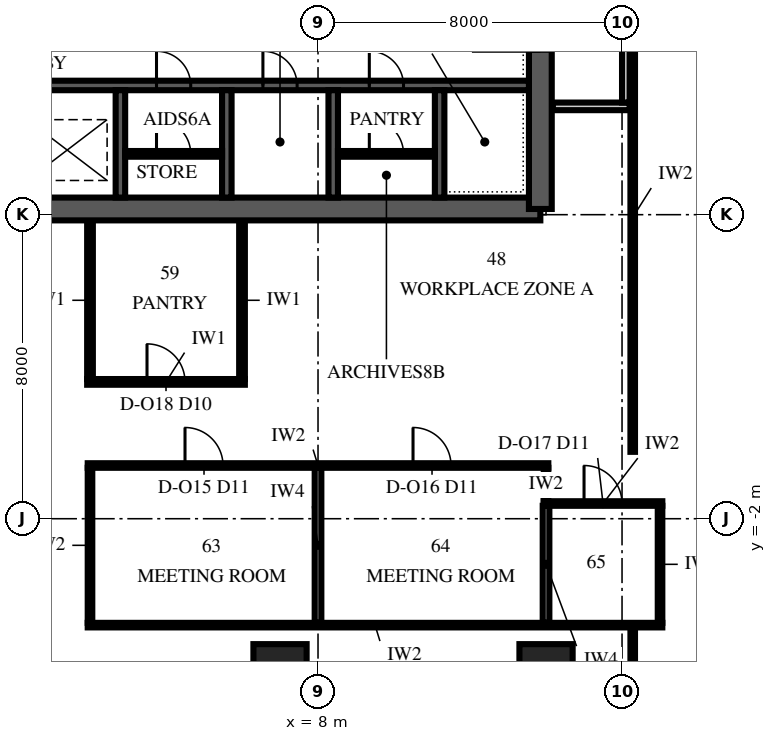
"""IFC4 building model, lengths in metres.
Left out: names, types, materials, properties, quantities, classifications, styles, units other than length and angle.
Written with IfcOpenShell. Run it as: python <this file> out.ifc"""

import sys

from ifc_helpers import new_model, si_unit, direction, frame, frame_2d, origin, origin_2d, place, context, subcontext, project, spatial, polyline, rectangle, outline, extrude, element, fill, save


model = new_model("IFC4")
c1 = context("Model", 3, precision=1e-05, world=origin(), true_north=direction((0.0, 1.0)))
c2 = subcontext(c1, "Body", "Model", "MODEL_VIEW")
j1 = project(units=[si_unit("LENGTHUNIT", "METRE"), si_unit("PLANEANGLEUNIT", "RADIAN")], contexts=[c1])
p1 = place(None, origin())
s1 = spatial("IfcSite", under=j1, at=p1, CompositionType="ELEMENT")
p2 = place(p1, origin())
s2 = spatial("IfcBuilding", under=s1, at=p2, CompositionType="ELEMENT")
p3 = place(p2, frame((0.0, 0.0, 190.0)))
s3 = spatial("IfcBuildingStorey", under=s2, at=p3, CompositionType="ELEMENT", Elevation=190.0)
for number, where, z_axis, x_axis in (
    (1, (7.0, -6.0, 0.0), (0.0, 0.0, 1.0), (1.0, 0.0, 0.0)),
    (2, (14.0, -6.0, 0.0), (0.0, 0.0, 1.0), (1.0, 0.0, 0.0)),
):
    element("IfcColumn", number, at=place(p3, frame(where, z_axis=z_axis, x_axis=x_axis)), inside=s3, PredefinedType="COLUMN", context=c2, shape_type="SweptSolid", body=[
        extrude(rectangle(XDim=1.4, YDim=1.4, at=origin_2d()), origin(), (0.0, 0.0, 1.0), 4.0),
    ])
p4 = place(p3, frame((-13.85, 6.15, 0.0), z_axis=(0.0, 0.0, 1.0), x_axis=(1.0, 0.0, 0.0)))
e3 = element("IfcWall", 3, at=p4, inside=s3, PredefinedType="SHEAR", context=c2, shape_type="SweptSolid", body=[
    extrude(rectangle(XDim=27.7, YDim=0.6, at=frame_2d((13.85, 0.0))), origin(), (0.0, 0.0, 1.0), 4.0),
])
p5 = place(p3, frame((13.85, 6.15, 0.0), z_axis=(0.0, 0.0, 1.0), x_axis=(0.0, 1.0, 0.0)))
e4 = element("IfcWall", 4, at=p5, inside=s3, PredefinedType="SHEAR", context=c2, shape_type="SweptSolid", body=[
    extrude(outline(polyline([(0.0, -0.3), (17.7, -0.3), (17.7, 0.0), (17.4, 0.0), (17.4, 0.3), (0.3, 0.3), (0.3, 0.0), (0.0, 0.0), (0.0, -0.3)])), origin(), (0.0, 0.0, 1.0), 4.0),
])
p6 = place(p5, frame((4.15, 0.0, 0.0)))
e5 = element("IfcOpeningElement", 5, at=p6, cuts=e4, PredefinedType="OPENING", context=c2, shape_type="SweptSolid", body=[
    extrude(rectangle(XDim=1.8, YDim=2.4, at=frame_2d((0.9, 1.2))), frame((0.0, 0.315, 0.0), z_axis=(0.0, -1.0, 0.0), x_axis=(1.0, 0.0, 0.0)), (0.0, 0.0, 1.0), 0.63),
])
p7 = place(p3, frame((-13.55, 9.4, 0.0), z_axis=(0.0, 0.0, 1.0), x_axis=(1.0, 0.0, 0.0)))
e6 = element("IfcWall", 6, at=p7, inside=s3, PredefinedType="SHEAR", context=c2, shape_type="SweptSolid", body=[
    extrude(rectangle(XDim=27.1, YDim=0.25, at=frame_2d((13.55, 0.0))), origin(), (0.0, 0.0, 1.0), 4.0),
])
p8 = place(p7, frame((0.4, 0.0, 0.0)))
e7 = element("IfcOpeningElement", 7, at=p8, cuts=e6, PredefinedType="OPENING", context=c2, shape_type="SweptSolid", body=[
    extrude(rectangle(XDim=1.1, YDim=2.1, at=frame_2d((0.55, 1.05))), frame((0.0, 0.14, 0.0), z_axis=(0.0, -1.0, 0.0), x_axis=(1.0, 0.0, 0.0)), (0.0, 0.0, 1.0), 0.28),
])
p9 = place(p7, frame((3.2, 0.0, 0.0)))
e8 = element("IfcOpeningElement", 8, at=p9, cuts=e6, PredefinedType="OPENING", context=c2, shape_type="SweptSolid", body=[
    extrude(rectangle(XDim=1.1, YDim=2.1, at=frame_2d((0.55, 1.05))), frame((0.0, 0.14, 0.0), z_axis=(0.0, -1.0, 0.0), x_axis=(1.0, 0.0, 0.0)), (0.0, 0.0, 1.0), 0.28),
])
p10 = place(p7, frame((6.0, 0.0, 0.0)))
e9 = element("IfcOpeningElement", 9, at=p10, cuts=e6, PredefinedType="OPENING", context=c2, shape_type="SweptSolid", body=[
    extrude(rectangle(XDim=1.1, YDim=2.1, at=frame_2d((0.55, 1.05))), frame((0.0, 0.14, 0.0), z_axis=(0.0, -1.0, 0.0), x_axis=(1.0, 0.0, 0.0)), (0.0, 0.0, 1.0), 0.28),
])
p11 = place(p7, frame((17.3, 0.0, 0.0)))
e10 = element("IfcOpeningElement", 10, at=p11, cuts=e6, PredefinedType="OPENING", context=c2, shape_type="SweptSolid", body=[
    extrude(rectangle(XDim=0.9, YDim=2.1, at=frame_2d((0.45, 1.05))), frame((0.0, 0.14, 0.0), z_axis=(0.0, -1.0, 0.0), x_axis=(1.0, 0.0, 0.0)), (0.0, 0.0, 1.0), 0.28),
])
p12 = place(p7, frame((20.1, 0.0, 0.0)))
e11 = element("IfcOpeningElement", 11, at=p12, cuts=e6, PredefinedType="OPENING", context=c2, shape_type="SweptSolid", body=[
    extrude(rectangle(XDim=0.9, YDim=2.1, at=frame_2d((0.45, 1.05))), frame((0.0, 0.14, 0.0), z_axis=(0.0, -1.0, 0.0), x_axis=(1.0, 0.0, 0.0)), (0.0, 0.0, 1.0), 0.28),
])
p13 = place(p7, frame((22.9, 0.0, 0.0)))
e12 = element("IfcOpeningElement", 12, at=p13, cuts=e6, PredefinedType="OPENING", context=c2, shape_type="SweptSolid", body=[
    extrude(rectangle(XDim=0.9, YDim=2.1, at=frame_2d((0.45, 1.05))), frame((0.0, 0.14, 0.0), z_axis=(0.0, -1.0, 0.0), x_axis=(1.0, 0.0, 0.0)), (0.0, 0.0, 1.0), 0.28),
])
for number, where, z_axis, x_axis in (
    (13, (2.8, 6.45, 0.0), (0.0, 0.0, 1.0), (0.0, 1.0, 0.0)),
    (14, (5.6, 6.45, 0.0), (0.0, 0.0, 1.0), (0.0, 1.0, 0.0)),
    (15, (8.4, 6.45, 0.0), (0.0, 0.0, 1.0), (0.0, 1.0, 0.0)),
    (16, (11.2, 6.45, 0.0), (0.0, 0.0, 1.0), (0.0, 1.0, 0.0)),
):
    element("IfcWall", number, at=place(p3, frame(where, z_axis=z_axis, x_axis=x_axis)), inside=s3, PredefinedType="SHEAR", context=c2, shape_type="SweptSolid", body=[
        extrude(rectangle(XDim=2.825, YDim=0.25, at=frame_2d((1.413, 0.0))), origin(), (0.0, 0.0, 1.0), 4.0),
    ])
p14 = place(p3, frame((2.925, 7.6, 0.0), z_axis=(0.0, 0.0, 1.0), x_axis=(1.0, 0.0, 0.0)))
e17 = element("IfcWall", 17, at=p14, inside=s3, PredefinedType="PARTITIONING", context=c2, shape_type="SweptSolid", body=[
    extrude(rectangle(XDim=2.55, YDim=0.15, at=frame_2d((1.275, 0.0))), origin(), (0.0, 0.0, 1.0), 3.85),
])
p15 = place(p14, frame((0.825, 0.0, 0.0)))
e18 = element("IfcOpeningElement", 18, at=p15, cuts=e17, PredefinedType="OPENING", context=c2, shape_type="SweptSolid", body=[
    extrude(rectangle(XDim=0.9, YDim=2.1, at=frame_2d((0.45, 1.05))), frame((0.0, 0.09, 0.0), z_axis=(0.0, -1.0, 0.0), x_axis=(1.0, 0.0, 0.0)), (0.0, 0.0, 1.0), 0.18),
])
p16 = place(p3, frame((8.525, 7.6, 0.0), z_axis=(0.0, 0.0, 1.0), x_axis=(1.0, 0.0, 0.0)))
e19 = element("IfcWall", 19, at=p16, inside=s3, PredefinedType="PARTITIONING", context=c2, shape_type="SweptSolid", body=[
    extrude(rectangle(XDim=2.55, YDim=0.15, at=frame_2d((1.275, 0.0))), origin(), (0.0, 0.0, 1.0), 3.85),
])
p17 = place(p16, frame((0.825, 0.0, 0.0)))
e20 = element("IfcOpeningElement", 20, at=p17, cuts=e19, PredefinedType="OPENING", context=c2, shape_type="SweptSolid", body=[
    extrude(rectangle(XDim=0.9, YDim=2.1, at=frame_2d((0.45, 1.05))), frame((0.0, 0.09, 0.0), z_axis=(0.0, -1.0, 0.0), x_axis=(1.0, 0.0, 0.0)), (0.0, 0.0, 1.0), 0.18),
])
p18 = place(p3, frame((1.94, -4.8, 0.0), z_axis=(0.0, 0.0, 1.0), x_axis=(1.0, 0.0, 0.0)))
e21 = element("IfcWall", 21, at=p18, inside=s3, PredefinedType="PARTITIONING", context=c2, shape_type="SweptSolid", body=[
    extrude(rectangle(XDim=15.12, YDim=0.12, at=frame_2d((7.56, 0.0))), origin(), (0.0, 0.0, 1.0), 3.25),
])
p19 = place(p3, frame((13.94, -1.6, 0.0), z_axis=(0.0, 0.0, 1.0), x_axis=(1.0, 0.0, 0.0)))
e22 = element("IfcWall", 22, at=p19, inside=s3, PredefinedType="PARTITIONING", context=c2, shape_type="SweptSolid", body=[
    extrude(rectangle(XDim=3.12, YDim=0.12, at=frame_2d((1.56, 0.0))), origin(), (0.0, 0.0, 1.0), 3.25),
])
p20 = place(p19, frame((1.06, 0.0, 0.0)))
e23 = element("IfcOpeningElement", 23, at=p20, cuts=e22, PredefinedType="OPENING", context=c2, shape_type="SweptSolid", body=[
    extrude(rectangle(XDim=1.0, YDim=2.4, at=frame_2d((0.5, 1.2))), frame((0.0, 0.075, 0.0), z_axis=(0.0, -1.0, 0.0), x_axis=(1.0, 0.0, 0.0)), (0.0, 0.0, 1.0), 0.15),
])
p21 = place(p3, frame((1.94, -0.6, 0.0), z_axis=(0.0, 0.0, 1.0), x_axis=(1.0, 0.0, 0.0)))
e24 = element("IfcWall", 24, at=p21, inside=s3, PredefinedType="PARTITIONING", context=c2, shape_type="SweptSolid", body=[
    extrude(rectangle(XDim=12.12, YDim=0.12, at=frame_2d((6.06, 0.0))), origin(), (0.0, 0.0, 1.0), 3.25),
])
p22 = place(p21, frame((2.56, 0.0, 0.0)))
e25 = element("IfcOpeningElement", 25, at=p22, cuts=e24, PredefinedType="OPENING", context=c2, shape_type="SweptSolid", body=[
    extrude(rectangle(XDim=1.0, YDim=2.4, at=frame_2d((0.5, 1.2))), frame((0.0, 0.075, 0.0), z_axis=(0.0, -1.0, 0.0), x_axis=(1.0, 0.0, 0.0)), (0.0, 0.0, 1.0), 0.15),
])
p23 = place(p21, frame((8.56, 0.0, 0.0)))
e26 = element("IfcOpeningElement", 26, at=p23, cuts=e24, PredefinedType="OPENING", context=c2, shape_type="SweptSolid", body=[
    extrude(rectangle(XDim=1.0, YDim=2.4, at=frame_2d((0.5, 1.2))), frame((0.0, 0.075, 0.0), z_axis=(0.0, -1.0, 0.0), x_axis=(1.0, 0.0, 0.0)), (0.0, 0.0, 1.0), 0.15),
])
p24 = place(p3, frame((1.925, 1.6, 0.0), z_axis=(0.0, 0.0, 1.0), x_axis=(1.0, 0.0, 0.0)))
e27 = element("IfcWall", 27, at=p24, inside=s3, PredefinedType="PARTITIONING", context=c2, shape_type="SweptSolid", body=[
    extrude(rectangle(XDim=4.15, YDim=0.15, at=frame_2d((2.075, 0.0))), origin(), (0.0, 0.0, 1.0), 3.25),
])
p25 = place(p24, frame((1.575, 0.0, 0.0)))
e28 = element("IfcOpeningElement", 28, at=p25, cuts=e27, PredefinedType="OPENING", context=c2, shape_type="SweptSolid", body=[
    extrude(rectangle(XDim=1.0, YDim=2.3, at=frame_2d((0.5, 1.15))), frame((0.0, 0.09, 0.0), z_axis=(0.0, -1.0, 0.0), x_axis=(1.0, 0.0, 0.0)), (0.0, 0.0, 1.0), 0.18),
])
p26 = place(p3, frame((14.18, 8.85, 0.0), z_axis=(0.0, 0.0, 1.0), x_axis=(1.0, 0.0, 0.0)))
e29 = element("IfcWall", 29, at=p26, inside=s3, PredefinedType="PARTITIONING", context=c2, shape_type="SweptSolid", body=[
    extrude(rectangle(XDim=2.02, YDim=0.2, at=frame_2d((1.01, 0.0))), origin(), (0.0, 0.0, 1.0), 3.85),
])
p27 = place(p3, frame((2.0, -4.74, 0.0), z_axis=(0.0, 0.0, 1.0), x_axis=(0.0, 1.0, 0.0)))
e30 = element("IfcWall", 30, at=p27, inside=s3, PredefinedType="PARTITIONING", context=c2, shape_type="SweptSolid", body=[
    extrude(rectangle(XDim=4.08, YDim=0.12, at=frame_2d((2.04, 0.0))), origin(), (0.0, 0.0, 1.0), 3.25),
])
for number, where, z_axis, x_axis in (
    (31, (2.0, 1.675, 0.0), (0.0, 0.0, 1.0), (0.0, 1.0, 0.0)),
    (32, (6.0, 1.675, 0.0), (0.0, 0.0, 1.0), (0.0, 1.0, 0.0)),
):
    element("IfcWall", number, at=place(p3, frame(where, z_axis=z_axis, x_axis=x_axis)), inside=s3, PredefinedType="PARTITIONING", context=c2, shape_type="SweptSolid", body=[
        extrude(rectangle(XDim=4.145, YDim=0.15, at=frame_2d((2.073, 0.0))), origin(), (0.0, 0.0, 1.0), 3.85),
    ])
p28 = place(p3, frame((8.0, -4.74, 0.0), z_axis=(0.0, 0.0, 1.0), x_axis=(0.0, 1.0, 0.0)))
e33 = element("IfcWall", 33, at=p28, inside=s3, PredefinedType="PARTITIONING", context=c2, shape_type="SweptSolid", body=[
    extrude(rectangle(XDim=4.08, YDim=0.175, at=frame_2d((2.04, 0.0))), origin(), (0.0, 0.0, 1.0), 3.85),
])
p29 = place(p3, frame((14.0, -4.74, 0.0), z_axis=(0.0, 0.0, 1.0), x_axis=(0.0, 1.0, 0.0)))
e34 = element("IfcWall", 34, at=p29, inside=s3, PredefinedType="PARTITIONING", context=c2, shape_type="SweptSolid", body=[
    extrude(rectangle(XDim=3.08, YDim=0.175, at=frame_2d((1.54, 0.0))), origin(), (0.0, 0.0, 1.0), 3.25),
])
p30 = place(p3, frame((14.0, -1.54, 0.0), z_axis=(0.0, 0.0, 1.0), x_axis=(0.0, 1.0, 0.0)))
e35 = element("IfcWall", 35, at=p30, inside=s3, PredefinedType="PARTITIONING", context=c2, shape_type="SweptSolid", body=[
    extrude(rectangle(XDim=0.88, YDim=0.12, at=frame_2d((0.44, 0.0))), origin(), (0.0, 0.0, 1.0), 3.25),
])
p31 = place(p3, frame((16.1, 8.95, 0.0), z_axis=(0.0, 0.0, 1.0), x_axis=(0.0, 1.0, 0.0)))
e36 = element("IfcWall", 36, at=p31, inside=s3, PredefinedType="PARTITIONING", context=c2, shape_type="SweptSolid", body=[
    extrude(rectangle(XDim=17.05, YDim=0.2, at=frame_2d((8.525, 0.0))), origin(), (0.0, 0.0, 1.0), 3.25),
])
p32 = place(p31, frame((3.45, 0.0, 0.0)))
e37 = element("IfcOpeningElement", 37, at=p32, cuts=e36, PredefinedType="OPENING", context=c2, shape_type="SweptSolid", body=[
    extrude(rectangle(XDim=1.2, YDim=2.4, at=frame_2d((0.6, 1.2))), frame((0.0, 0.115, 0.0), z_axis=(0.0, -1.0, 0.0), x_axis=(1.0, 0.0, 0.0)), (0.0, 0.0, 1.0), 0.23),
])
p33 = place(p3, frame((17.0, -4.74, 0.0), z_axis=(0.0, 0.0, 1.0), x_axis=(0.0, 1.0, 0.0)))
e38 = element("IfcWall", 38, at=p33, inside=s3, PredefinedType="PARTITIONING", context=c2, shape_type="SweptSolid", body=[
    extrude(rectangle(XDim=3.08, YDim=0.12, at=frame_2d((1.54, 0.0))), origin(), (0.0, 0.0, 1.0), 3.85),
])
p34 = place(p3, frame((16.281, -16.1, 0.0), z_axis=(0.0, 0.0, 1.0), x_axis=(0.0, 1.0, 0.0)))
e39 = element("IfcWall", 39, at=p34, inside=s3, PredefinedType="PARTITIONING", context=c2, shape_type="SweptSolid", body=[
    extrude(rectangle(XDim=11.22, YDim=0.12, at=frame_2d((5.61, 0.0))), origin(), (0.0, 0.0, 1.0), 2.842),
])
p35 = place(p3, frame((16.281, -0.24, 0.0), z_axis=(0.0, 0.0, 1.0), x_axis=(0.0, 1.0, 0.0)))
e40 = element("IfcWall", 40, at=p35, inside=s3, PredefinedType="PARTITIONING", context=c2, shape_type="SweptSolid", body=[
    extrude(rectangle(XDim=12.34, YDim=0.12, at=frame_2d((6.17, 0.0))), origin(), (0.0, 0.0, 1.0), 2.842),
])
p36 = place(p11, origin())
e41 = element("IfcDoor", 41, at=p36, inside=s3, OperationType="SINGLE_SWING_LEFT", PredefinedType="DOOR", context=c2, shape_type="SweptSolid", body=[
    extrude(rectangle(XDim=0.9, YDim=2.1, at=frame_2d((0.45, 1.05))), frame((0.0, 0.125, 0.0), z_axis=(0.0, -1.0, 0.0), x_axis=(1.0, 0.0, 0.0)), (0.0, 0.0, 1.0), 0.25),
])
fill(e10, e41)
p37 = place(p15, origin())
e42 = element("IfcDoor", 42, at=p37, inside=s3, OperationType="SINGLE_SWING_LEFT", PredefinedType="DOOR", context=c2, shape_type="SweptSolid", body=[
    extrude(rectangle(XDim=0.9, YDim=2.1, at=frame_2d((0.45, 1.05))), frame((0.0, 0.075, 0.0), z_axis=(0.0, -1.0, 0.0), x_axis=(1.0, 0.0, 0.0)), (0.0, 0.0, 1.0), 0.149),
])
fill(e18, e42)
p38 = place(p12, origin())
e43 = element("IfcDoor", 43, at=p38, inside=s3, OperationType="SINGLE_SWING_LEFT", PredefinedType="DOOR", context=c2, shape_type="SweptSolid", body=[
    extrude(rectangle(XDim=0.9, YDim=2.1, at=frame_2d((0.45, 1.05))), frame((0.0, 0.125, 0.0), z_axis=(0.0, -1.0, 0.0), x_axis=(1.0, 0.0, 0.0)), (0.0, 0.0, 1.0), 0.25),
])
fill(e11, e43)
p39 = place(p13, origin())
e44 = element("IfcDoor", 44, at=p39, inside=s3, OperationType="SINGLE_SWING_LEFT", PredefinedType="DOOR", context=c2, shape_type="SweptSolid", body=[
    extrude(rectangle(XDim=0.9, YDim=2.1, at=frame_2d((0.45, 1.05))), frame((0.0, 0.125, 0.0), z_axis=(0.0, -1.0, 0.0), x_axis=(1.0, 0.0, 0.0)), (0.0, 0.0, 1.0), 0.25),
])
fill(e12, e44)
p40 = place(p17, origin())
e45 = element("IfcDoor", 45, at=p40, inside=s3, OperationType="SINGLE_SWING_LEFT", PredefinedType="DOOR", context=c2, shape_type="SweptSolid", body=[
    extrude(rectangle(XDim=0.9, YDim=2.1, at=frame_2d((0.45, 1.05))), frame((0.0, 0.075, 0.0), z_axis=(0.0, -1.0, 0.0), x_axis=(1.0, 0.0, 0.0)), (0.0, 0.0, 1.0), 0.149),
])
fill(e20, e45)
p41 = place(p22, origin())
e46 = element("IfcDoor", 46, at=p41, inside=s3, OperationType="SINGLE_SWING_RIGHT", PredefinedType="DOOR", context=c2, shape_type="SweptSolid", body=[
    extrude(rectangle(XDim=1.0, YDim=2.4, at=frame_2d((0.5, 1.2))), frame((0.0, 0.06, 0.0), z_axis=(0.0, -1.0, 0.0), x_axis=(1.0, 0.0, 0.0)), (0.0, 0.0, 1.0), 0.12),
])
fill(e25, e46)
p42 = place(p23, origin())
e47 = element("IfcDoor", 47, at=p42, inside=s3, OperationType="SINGLE_SWING_RIGHT", PredefinedType="DOOR", context=c2, shape_type="SweptSolid", body=[
    extrude(rectangle(XDim=1.0, YDim=2.4, at=frame_2d((0.5, 1.2))), frame((0.0, 0.06, 0.0), z_axis=(0.0, -1.0, 0.0), x_axis=(1.0, 0.0, 0.0)), (0.0, 0.0, 1.0), 0.12),
])
fill(e26, e47)
p43 = place(p20, origin())
e48 = element("IfcDoor", 48, at=p43, inside=s3, OperationType="SINGLE_SWING_RIGHT", PredefinedType="DOOR", context=c2, shape_type="SweptSolid", body=[
    extrude(rectangle(XDim=1.0, YDim=2.4, at=frame_2d((0.5, 1.2))), frame((0.0, 0.06, 0.0), z_axis=(0.0, -1.0, 0.0), x_axis=(1.0, 0.0, 0.0)), (0.0, 0.0, 1.0), 0.12),
])
fill(e23, e48)
p44 = place(p25, origin())
e49 = element("IfcDoor", 49, at=p44, inside=s3, OperationType="SINGLE_SWING_LEFT", PredefinedType="DOOR", context=c2, shape_type="SweptSolid", body=[
    extrude(rectangle(XDim=1.0, YDim=2.3, at=frame_2d((0.5, 1.15))), frame((0.0, 0.075, 0.0), z_axis=(0.0, -1.0, 0.0), x_axis=(1.0, 0.0, 0.0)), (0.0, 0.0, 1.0), 0.149),
])
fill(e28, e49)
save(model, sys.argv[1])
